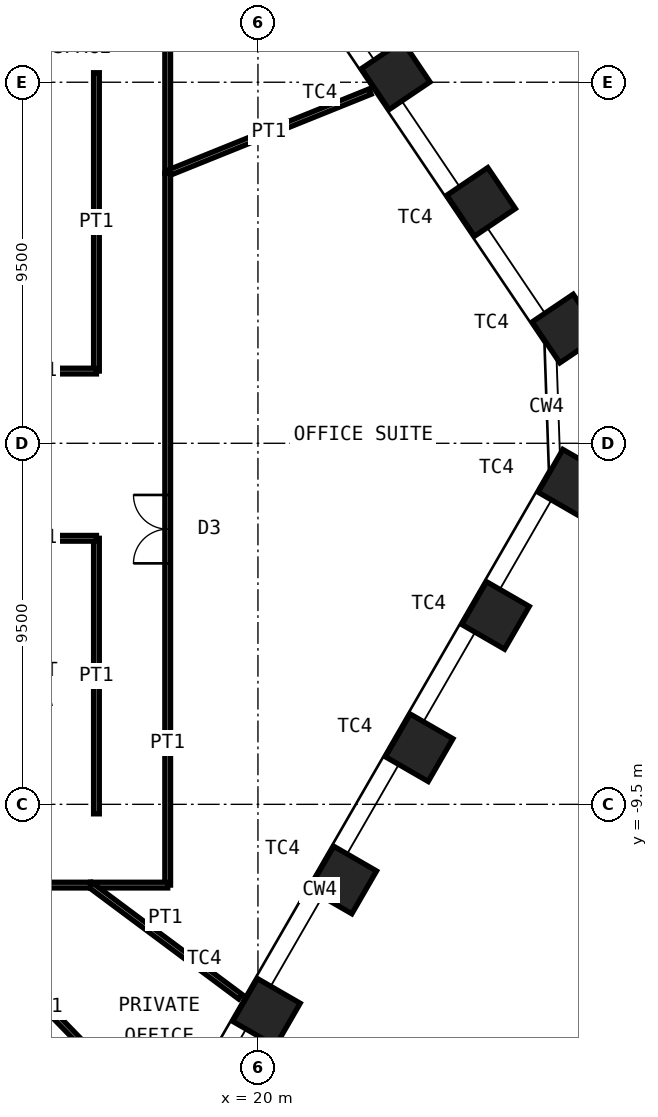
"""IFC4 building model, lengths in metres.
Left out: names, types, materials, properties, quantities, classifications, styles, units other than length and angle.
Written with IfcOpenShell. Run it as: python <this file> out.ifc"""

import sys

from ifc_helpers import new_model, si_unit, direction, frame, frame_2d, origin, origin_2d, place, context, subcontext, project, spatial, rectangle, hollow_rectangle, extrude, element, fill, save


model = new_model("IFC4")
c1 = context("Model", 3, precision=1e-05, world=origin(), true_north=direction((0.0, 1.0)))
c2 = subcontext(c1, "Body", "Model", "MODEL_VIEW")
j1 = project(units=[si_unit("LENGTHUNIT", "METRE"), si_unit("PLANEANGLEUNIT", "RADIAN")], contexts=[c1])
p1 = place(None, origin())
s1 = spatial("IfcSite", under=j1, at=p1, CompositionType="ELEMENT")
p2 = place(p1, origin())
s2 = spatial("IfcBuilding", under=s1, at=p2, CompositionType="ELEMENT")
p3 = place(p2, frame((0.0, 0.0, 161.8)))
s3 = spatial("IfcBuildingStorey", under=s2, at=p3, CompositionType="ELEMENT", Elevation=161.8)
for number, where, z_axis, x_axis in (
    (1, (23.625, 9.682, 0.0), (0.0, 0.0, 1.0), (-0.559, 0.829, 0.0)),
    (2, (25.872, 6.351, 0.0), (0.0, 0.0, 1.0), (-0.559, 0.829, 0.0)),
    (3, (28.119, 3.019, 0.0), (0.0, 0.0, 1.0), (-0.559, 0.829, 0.0)),
    (4, (28.261, -1.05, 0.0), (0.0, 0.0, 1.0), (0.5, 0.866, 0.0)),
    (5, (26.252, -4.53, 0.0), (0.0, 0.0, 1.0), (0.5, 0.866, 0.0)),
    (6, (24.242, -8.011, 0.0), (0.0, 0.0, 1.0), (0.5, 0.866, 0.0)),
    (7, (22.233, -11.491, 0.0), (0.0, 0.0, 1.0), (0.5, 0.866, 0.0)),
    (8, (20.223, -14.972, 0.0), (0.0, 0.0, 1.0), (0.5, 0.866, 0.0)),
):
    element("IfcColumn", number, at=place(p3, frame(where, z_axis=z_axis, x_axis=x_axis)), inside=s3, PredefinedType="COLUMN", context=c2, shape_type="SweptSolid", body=[
        extrude(hollow_rectangle(XDim=1.3, YDim=1.3, WallThickness=0.1, at=origin_2d()), origin(), (0.0, 0.0, 1.0), 4.2),
    ])
p4 = place(p3, frame((17.625, 11.625, 0.0), z_axis=(0.0, 0.0, 1.0), x_axis=(0.0, -1.0, 0.0)))
e9 = element("IfcWall", 9, at=p4, inside=s3, PredefinedType="PARTITIONING", context=c2, shape_type="SweptSolid", body=[
    extrude(rectangle(XDim=4.519, YDim=0.15, at=frame_2d((2.26, 0.0))), origin(), (0.0, 0.0, 1.0), 4.03),
])
p5 = place(p3, frame((22.951, 9.254, 0.0), z_axis=(0.0, 0.0, 1.0), x_axis=(-0.927444087873, -0.373961848147, 0.0)))
e10 = element("IfcWall", 10, at=p5, inside=s3, PredefinedType="PARTITIONING", context=c2, shape_type="SweptSolid", body=[
    extrude(rectangle(XDim=5.743, YDim=0.15, at=frame_2d((2.872, 0.0))), origin(), (0.0, 0.0, 1.0), 3.28),
])
p6 = place(p3, frame((17.625, 7.106, 0.0), z_axis=(0.0, 0.0, 1.0), x_axis=(0.0, -1.0, 0.0)))
e11 = element("IfcWall", 11, at=p6, inside=s3, PredefinedType="PARTITIONING", context=c2, shape_type="SweptSolid", body=[
    extrude(rectangle(XDim=18.731, YDim=0.15, at=frame_2d((9.365, 0.0))), origin(), (0.0, 0.0, 1.0), 4.03),
])
p7 = place(p6, frame((8.466, 0.0, 0.0)))
e12 = element("IfcOpeningElement", 12, at=p7, cuts=e11, PredefinedType="OPENING", context=c2, shape_type="SweptSolid", body=[
    extrude(rectangle(XDim=1.8, YDim=2.4, at=frame_2d((0.9, 1.2))), frame((0.0, 0.085, 0.0), z_axis=(0.0, -1.0, 0.0), x_axis=(1.0, 0.0, 0.0)), (0.0, 0.0, 1.0), 0.17),
])
p8 = place(p3, frame((17.625, -11.625, 0.0), z_axis=(0.0, 0.0, 1.0), x_axis=(-1.0, 0.0, 0.0)))
e13 = element("IfcWall", 13, at=p8, inside=s3, PredefinedType="PARTITIONING", context=c2, shape_type="SweptSolid", body=[
    extrude(rectangle(XDim=2.029, YDim=0.15, at=frame_2d((1.014, 0.0))), origin(), (0.0, 0.0, 1.0), 4.03),
])
p9 = place(p3, frame((19.537, -14.562, 0.0), z_axis=(0.0, 0.0, 1.0), x_axis=(-0.801778753003, 0.597620976233, 0.0)))
e14 = element("IfcWall", 14, at=p9, inside=s3, PredefinedType="PARTITIONING", context=c2, shape_type="SweptSolid", body=[
    extrude(rectangle(XDim=4.915, YDim=0.15, at=frame_2d((2.458, 0.0))), origin(), (0.0, 0.0, 1.0), 3.28),
])
p10 = place(p3, frame((15.596, -11.625, 0.0), z_axis=(0.0, 0.0, 1.0), x_axis=(-1.0, 0.0, 0.0)))
e15 = element("IfcWall", 15, at=p10, inside=s3, PredefinedType="PARTITIONING", context=c2, shape_type="SweptSolid", body=[
    extrude(rectangle(XDim=4.289, YDim=0.15, at=frame_2d((2.145, 0.0))), origin(), (0.0, 0.0, 1.0), 4.03),
])
p11 = place(p10, frame((1.645, 0.0, 0.0)))
e16 = element("IfcOpeningElement", 16, at=p11, cuts=e15, PredefinedType="OPENING", context=c2, shape_type="SweptSolid", body=[
    extrude(rectangle(XDim=1.0, YDim=2.4, at=frame_2d((0.5, 1.2))), frame((0.0, 0.085, 0.0), z_axis=(0.0, -1.0, 0.0), x_axis=(1.0, 0.0, 0.0)), (0.0, 0.0, 1.0), 0.17),
])
p12 = place(p3, frame((17.538, -18.031, 0.0), z_axis=(0.0, 0.0, 1.0), x_axis=(-0.697230918085, 0.716846599257, 0.0)))
e17 = element("IfcWall", 17, at=p12, inside=s3, PredefinedType="PARTITIONING", context=c2, shape_type="SweptSolid", body=[
    extrude(rectangle(XDim=8.936, YDim=0.15, at=frame_2d((4.468, 0.0))), origin(), (0.0, 0.0, 1.0), 3.28),
])
p13 = place(p3, frame((15.54, -21.502, 0.0), z_axis=(0.0, 0.0, 1.0), x_axis=(-0.585731902034, 0.810504866697, 0.0)))
e18 = element("IfcWall", 18, at=p13, inside=s3, PredefinedType="PARTITIONING", context=c2, shape_type="SweptSolid", body=[
    extrude(rectangle(XDim=12.187, YDim=0.15, at=frame_2d((6.093, 0.0))), origin(), (0.0, 0.0, 1.0), 2.93),
])
p14 = place(p3, frame((15.75, 1.9, 0.0), z_axis=(0.0, 0.0, 1.0), x_axis=(0.0, 1.0, 0.0)))
e19 = element("IfcWall", 19, at=p14, inside=s3, PredefinedType="PARTITIONING", context=c2, shape_type="SweptSolid", body=[
    extrude(rectangle(XDim=7.85, YDim=0.15, at=frame_2d((3.925, 0.0))), origin(), (0.0, 0.0, 1.0), 4.03),
])
p15 = place(p3, frame((12.75, 1.9, 0.0), z_axis=(0.0, 0.0, 1.0), x_axis=(1.0, 0.0, 0.0)))
e20 = element("IfcWall", 20, at=p15, inside=s3, PredefinedType="PARTITIONING", context=c2, shape_type="SweptSolid", body=[
    extrude(rectangle(XDim=3.0, YDim=0.15, at=frame_2d((1.5, 0.0))), origin(), (0.0, 0.0, 1.0), 2.93),
])
p16 = place(p3, frame((15.75, -9.75, 0.0), z_axis=(0.0, 0.0, 1.0), x_axis=(0.0, 1.0, 0.0)))
e21 = element("IfcWall", 21, at=p16, inside=s3, PredefinedType="PARTITIONING", context=c2, shape_type="SweptSolid", body=[
    extrude(rectangle(XDim=7.25, YDim=0.15, at=frame_2d((3.625, 0.0))), origin(), (0.0, 0.0, 1.0), 4.03),
])
p17 = place(p3, frame((12.75, -2.5, 0.0), z_axis=(0.0, 0.0, 1.0), x_axis=(1.0, 0.0, 0.0)))
e22 = element("IfcWall", 22, at=p17, inside=s3, PredefinedType="PARTITIONING", context=c2, shape_type="SweptSolid", body=[
    extrude(rectangle(XDim=3.0, YDim=0.15, at=frame_2d((1.5, 0.0))), origin(), (0.0, 0.0, 1.0), 3.28),
])
p18 = place(p7, origin())
e23 = element("IfcDoor", 23, at=p18, inside=s3, OperationType="DOUBLE_DOOR_DOUBLE_SWING", PredefinedType="DOOR", context=c2, shape_type="SweptSolid", body=[
    extrude(rectangle(XDim=1.8, YDim=2.4, at=frame_2d((0.9, 1.2))), frame((0.0, 0.025, 0.0), z_axis=(0.0, -1.0, 0.0), x_axis=(1.0, 0.0, 0.0)), (0.0, 0.0, 1.0), 0.05),
])
fill(e12, e23)
save(model, sys.argv[1])
